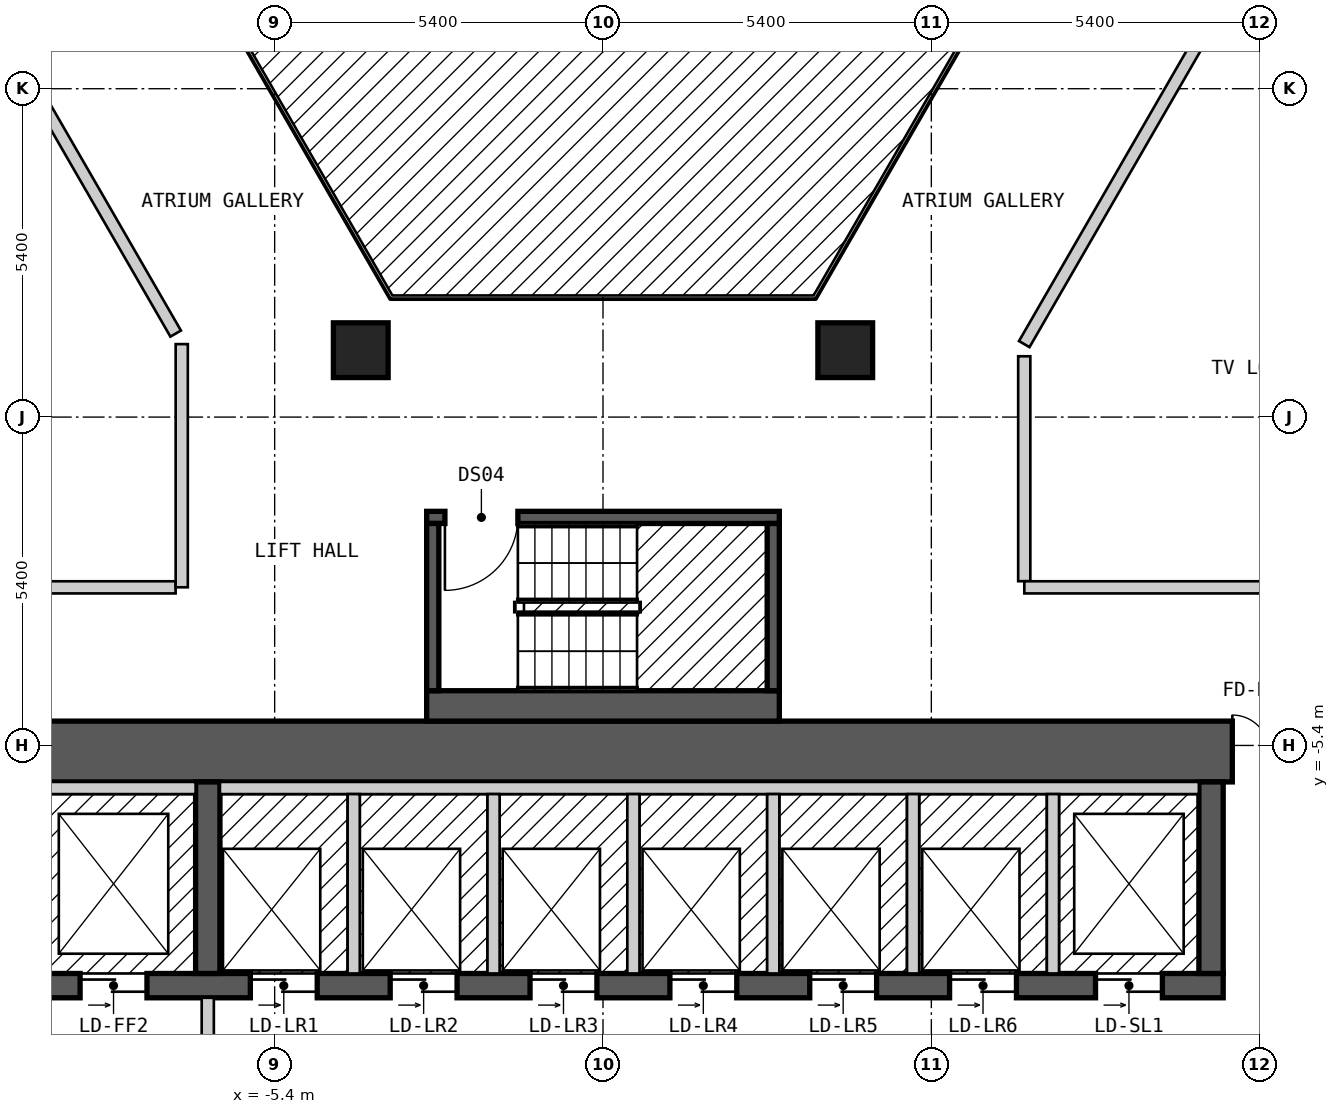
"""IFC4 building model, lengths in metres.
Left out: names, types, materials, properties, quantities, classifications, styles, units other than length and angle.
Written with IfcOpenShell. Run it as: python <this file> out.ifc"""

import sys

from ifc_helpers import new_model, si_unit, direction, frame, frame_2d, origin, origin_2d, place, context, subcontext, project, spatial, rectangle, extrude, element, fill, save


model = new_model("IFC4")
c1 = context("Model", 3, precision=1e-05, world=origin(), true_north=direction((0.0, 1.0)))
c2 = subcontext(c1, "Body", "Model", "MODEL_VIEW")
j1 = project(units=[si_unit("LENGTHUNIT", "METRE"), si_unit("PLANEANGLEUNIT", "RADIAN")], contexts=[c1])
p1 = place(None, origin())
s1 = spatial("IfcSite", under=j1, at=p1, CompositionType="ELEMENT")
p2 = place(p1, origin())
s2 = spatial("IfcBuilding", under=s1, at=p2, CompositionType="ELEMENT")
p3 = place(p2, frame((0.0, 0.0, 102.0)))
s3 = spatial("IfcBuildingStorey", under=s2, at=p3, CompositionType="ELEMENT", Elevation=102.0)
for number, where, z_axis, x_axis in (
    (1, (3.984, 1.1, 0.0), (0.0, 0.0, 1.0), (1.0, 0.0, 0.0)),
    (2, (-3.984, 1.1, 0.0), (0.0, 0.0, 1.0), (1.0, 0.0, 0.0)),
):
    element("IfcColumn", number, at=place(p3, frame(where, z_axis=z_axis, x_axis=x_axis)), inside=s3, PredefinedType="COLUMN", context=c2, shape_type="SweptSolid", body=[
        extrude(rectangle(XDim=0.9, YDim=0.9, at=origin_2d()), origin(), (0.0, 0.0, 1.0), 3.0),
    ])
p4 = place(p3, frame((-13.3, -5.5, 0.0), z_axis=(0.0, 0.0, 1.0), x_axis=(1.0, 0.0, 0.0)))
e3 = element("IfcWall", 3, at=p4, inside=s3, PredefinedType="SHEAR", context=c2, shape_type="SweptSolid", body=[
    extrude(rectangle(XDim=26.6, YDim=1.0, at=frame_2d((13.3, 0.0))), origin(), (0.0, 0.0, 1.0), 2.7),
])
p5 = place(p4, frame((23.65, 0.0, 0.0)))
e4 = element("IfcOpeningElement", 4, at=p5, cuts=e3, PredefinedType="OPENING", context=c2, shape_type="SweptSolid", body=[
    extrude(rectangle(XDim=1.2, YDim=2.1, at=frame_2d((0.6, 1.05))), frame((0.0, 0.51, 0.0), z_axis=(0.0, -1.0, 0.0), x_axis=(1.0, 0.0, 0.0)), (0.0, 0.0, 1.0), 1.02),
])
p6 = place(p3, frame((-12.3, -9.35, 0.0), z_axis=(0.0, 0.0, 1.0), x_axis=(1.0, 0.0, 0.0)))
e5 = element("IfcWall", 5, at=p6, inside=s3, PredefinedType="SHEAR", context=c2, shape_type="SweptSolid", body=[
    extrude(rectangle(XDim=22.5, YDim=0.4, at=frame_2d((11.25, 0.0))), origin(), (0.0, 0.0, 1.0), 2.7),
])
p7 = place(p6, frame((0.9, 0.0, 0.0)))
e6 = element("IfcOpeningElement", 6, at=p7, cuts=e5, PredefinedType="OPENING", context=c2, shape_type="SweptSolid", body=[
    extrude(rectangle(XDim=1.1, YDim=2.1, at=frame_2d((0.55, 1.05))), frame((0.0, 0.21, 0.0), z_axis=(0.0, -1.0, 0.0), x_axis=(1.0, 0.0, 0.0)), (0.0, 0.0, 1.0), 0.42),
])
p8 = place(p6, frame((3.7, 0.0, 0.0)))
e7 = element("IfcOpeningElement", 7, at=p8, cuts=e5, PredefinedType="OPENING", context=c2, shape_type="SweptSolid", body=[
    extrude(rectangle(XDim=1.1, YDim=2.1, at=frame_2d((0.55, 1.05))), frame((0.0, 0.21, 0.0), z_axis=(0.0, -1.0, 0.0), x_axis=(1.0, 0.0, 0.0)), (0.0, 0.0, 1.0), 0.42),
])
p9 = place(p6, frame((6.5, 0.0, 0.0)))
e8 = element("IfcOpeningElement", 8, at=p9, cuts=e5, PredefinedType="OPENING", context=c2, shape_type="SweptSolid", body=[
    extrude(rectangle(XDim=1.1, YDim=2.1, at=frame_2d((0.55, 1.05))), frame((0.0, 0.21, 0.0), z_axis=(0.0, -1.0, 0.0), x_axis=(1.0, 0.0, 0.0)), (0.0, 0.0, 1.0), 0.42),
])
p10 = place(p6, frame((8.8, 0.0, 0.0)))
e9 = element("IfcOpeningElement", 9, at=p10, cuts=e5, PredefinedType="OPENING", context=c2, shape_type="SweptSolid", body=[
    extrude(rectangle(XDim=1.1, YDim=2.1, at=frame_2d((0.55, 1.05))), frame((0.0, 0.21, 0.0), z_axis=(0.0, -1.0, 0.0), x_axis=(1.0, 0.0, 0.0)), (0.0, 0.0, 1.0), 0.42),
])
p11 = place(p6, frame((11.1, 0.0, 0.0)))
e10 = element("IfcOpeningElement", 10, at=p11, cuts=e5, PredefinedType="OPENING", context=c2, shape_type="SweptSolid", body=[
    extrude(rectangle(XDim=1.1, YDim=2.1, at=frame_2d((0.55, 1.05))), frame((0.0, 0.21, 0.0), z_axis=(0.0, -1.0, 0.0), x_axis=(1.0, 0.0, 0.0)), (0.0, 0.0, 1.0), 0.42),
])
p12 = place(p6, frame((13.4, 0.0, 0.0)))
e11 = element("IfcOpeningElement", 11, at=p12, cuts=e5, PredefinedType="OPENING", context=c2, shape_type="SweptSolid", body=[
    extrude(rectangle(XDim=1.1, YDim=2.1, at=frame_2d((0.55, 1.05))), frame((0.0, 0.21, 0.0), z_axis=(0.0, -1.0, 0.0), x_axis=(1.0, 0.0, 0.0)), (0.0, 0.0, 1.0), 0.42),
])
p13 = place(p6, frame((15.7, 0.0, 0.0)))
e12 = element("IfcOpeningElement", 12, at=p13, cuts=e5, PredefinedType="OPENING", context=c2, shape_type="SweptSolid", body=[
    extrude(rectangle(XDim=1.1, YDim=2.1, at=frame_2d((0.55, 1.05))), frame((0.0, 0.21, 0.0), z_axis=(0.0, -1.0, 0.0), x_axis=(1.0, 0.0, 0.0)), (0.0, 0.0, 1.0), 0.42),
])
p14 = place(p6, frame((18.0, 0.0, 0.0)))
e13 = element("IfcOpeningElement", 13, at=p14, cuts=e5, PredefinedType="OPENING", context=c2, shape_type="SweptSolid", body=[
    extrude(rectangle(XDim=1.1, YDim=2.1, at=frame_2d((0.55, 1.05))), frame((0.0, 0.21, 0.0), z_axis=(0.0, -1.0, 0.0), x_axis=(1.0, 0.0, 0.0)), (0.0, 0.0, 1.0), 0.42),
])
p15 = place(p6, frame((20.4, 0.0, 0.0)))
e14 = element("IfcOpeningElement", 14, at=p15, cuts=e5, PredefinedType="OPENING", context=c2, shape_type="SweptSolid", body=[
    extrude(rectangle(XDim=1.1, YDim=2.1, at=frame_2d((0.55, 1.05))), frame((0.0, 0.21, 0.0), z_axis=(0.0, -1.0, 0.0), x_axis=(1.0, 0.0, 0.0)), (0.0, 0.0, 1.0), 0.42),
])
for number, where, z_axis, x_axis in (
    (15, (-6.5, -9.15, 0.0), (0.0, 0.0, 1.0), (0.0, 1.0, 0.0)),
    (16, (10.0, -9.15, 0.0), (0.0, 0.0, 1.0), (0.0, 1.0, 0.0)),
):
    element("IfcWall", number, at=place(p3, frame(where, z_axis=z_axis, x_axis=x_axis)), inside=s3, PredefinedType="SHEAR", context=c2, shape_type="SweptSolid", body=[
        extrude(rectangle(XDim=3.15, YDim=0.4, at=frame_2d((1.575, 0.0))), origin(), (0.0, 0.0, 1.0), 2.7),
    ])
p16 = place(p3, frame((-2.9, -4.75, 0.0), z_axis=(0.0, 0.0, 1.0), x_axis=(1.0, 0.0, 0.0)))
e17 = element("IfcWall", 17, at=p16, inside=s3, PredefinedType="SOLIDWALL", context=c2, shape_type="SweptSolid", body=[
    extrude(rectangle(XDim=5.8, YDim=0.5, at=frame_2d((2.9, 0.0))), origin(), (0.0, 0.0, 1.0), 2.7),
])
p17 = place(p3, frame((-2.9, -1.65, 0.0), z_axis=(0.0, 0.0, 1.0), x_axis=(1.0, 0.0, 0.0)))
e18 = element("IfcWall", 18, at=p17, inside=s3, PredefinedType="SOLIDWALL", context=c2, shape_type="SweptSolid", body=[
    extrude(rectangle(XDim=5.8, YDim=0.2, at=frame_2d((2.9, 0.0))), origin(), (0.0, 0.0, 1.0), 2.7),
])
p18 = place(p17, frame((0.3, 0.0, 0.0)))
e19 = element("IfcOpeningElement", 19, at=p18, cuts=e18, PredefinedType="OPENING", context=c2, shape_type="SweptSolid", body=[
    extrude(rectangle(XDim=1.2, YDim=2.1, at=frame_2d((0.6, 1.05))), frame((0.0, 0.11, 0.0), z_axis=(0.0, -1.0, 0.0), x_axis=(1.0, 0.0, 0.0)), (0.0, 0.0, 1.0), 0.22),
])
for number, where, z_axis, x_axis in (
    (20, (-2.8, -4.5, 0.0), (0.0, 0.0, 1.0), (0.0, 1.0, 0.0)),
    (21, (2.8, -4.5, 0.0), (0.0, 0.0, 1.0), (0.0, 1.0, 0.0)),
):
    element("IfcWall", number, at=place(p3, frame(where, z_axis=z_axis, x_axis=x_axis)), inside=s3, PredefinedType="SOLIDWALL", context=c2, shape_type="SweptSolid", body=[
        extrude(rectangle(XDim=2.75, YDim=0.2, at=frame_2d((1.375, 0.0))), origin(), (0.0, 0.0, 1.0), 2.7),
    ])
p19 = place(p3, frame((-10.796, 7.899, 0.0), z_axis=(0.0, 0.0, 1.0), x_axis=(0.500010383074, -0.866019409031, 0.0)))
e22 = element("IfcWall", 22, at=p19, inside=s3, PredefinedType="PARTITIONING", context=c2, shape_type="SweptSolid", body=[
    extrude(rectangle(XDim=7.535, YDim=0.2, at=frame_2d((3.768, 0.0))), origin(), (0.0, 0.0, 1.0), 2.7),
])
p20 = place(p3, frame((8.488, 16.5, 0.0), z_axis=(0.0, 0.0, 1.0), x_axis=(0.499986836607, -0.86603300354, 0.0)))
e23 = element("IfcWall", 23, at=p20, inside=s3, PredefinedType="PARTITIONING", context=c2, shape_type="SweptSolid", body=[
    extrude(rectangle(XDim=20.09, YDim=0.2, at=frame_2d((10.045, 0.0))), origin(), (0.0, 0.0, 1.0), 2.7),
])
p21 = place(p20, frame((14.569, 0.0, 0.0)))
e24 = element("IfcOpeningElement", 24, at=p21, cuts=e23, PredefinedType="OPENING", context=c2, shape_type="SweptSolid", body=[
    extrude(rectangle(XDim=1.0, YDim=2.1, at=frame_2d((0.5, 1.05))), frame((0.0, 0.11, 0.0), z_axis=(0.0, -1.0, 0.0), x_axis=(1.0, 0.0, 0.0)), (0.0, 0.0, 1.0), 0.22),
])
p22 = place(p20, frame((4.547, 0.0, 0.0)))
e25 = element("IfcOpeningElement", 25, at=p22, cuts=e23, PredefinedType="OPENING", context=c2, shape_type="SweptSolid", body=[
    extrude(rectangle(XDim=1.0, YDim=2.1, at=frame_2d((0.5, 1.05))), frame((0.0, 0.11, 0.0), z_axis=(0.0, -1.0, 0.0), x_axis=(1.0, 0.0, 0.0)), (0.0, 0.0, 1.0), 0.22),
])
p23 = place(p3, frame((6.928, 1.0, 0.0), z_axis=(0.0, 0.0, 1.0), x_axis=(0.0, -1.0, 0.0)))
e26 = element("IfcWall", 26, at=p23, inside=s3, PredefinedType="PARTITIONING", context=c2, shape_type="SweptSolid", body=[
    extrude(rectangle(XDim=3.699, YDim=0.2, at=frame_2d((1.85, 0.0))), origin(), (0.0, 0.0, 1.0), 2.7),
])
p24 = place(p3, frame((-15.011, -2.8, 0.0), z_axis=(0.0, 0.0, 1.0), x_axis=(1.0, 0.0, 0.0)))
e27 = element("IfcWall", 27, at=p24, inside=s3, PredefinedType="PARTITIONING", context=c2, shape_type="SweptSolid", body=[
    extrude(rectangle(XDim=7.982, YDim=0.2, at=frame_2d((3.991, 0.0))), origin(), (0.0, 0.0, 1.0), 2.7),
])
p25 = place(p3, frame((6.929, -2.8, 0.0), z_axis=(0.0, 0.0, 1.0), x_axis=(1.0, 0.0, 0.0)))
e28 = element("IfcWall", 28, at=p25, inside=s3, PredefinedType="PARTITIONING", context=c2, shape_type="SweptSolid", body=[
    extrude(rectangle(XDim=7.966, YDim=0.2, at=frame_2d((3.983, 0.0))), origin(), (0.0, 0.0, 1.0), 2.7),
])
p26 = place(p3, frame((6.928, 1.2, 0.0), z_axis=(0.0, 0.0, 1.0), x_axis=(0.500055327065, 0.865993458332, 0.0)))
e29 = element("IfcWall", 29, at=p26, inside=s3, PredefinedType="PARTITIONING", context=c2, shape_type="SweptSolid", body=[
    extrude(rectangle(XDim=7.851, YDim=0.2, at=frame_2d((3.926, 0.0))), origin(), (0.0, 0.0, 1.0), 2.7),
])
p27 = place(p3, frame((-18.562, -0.951, 0.0), z_axis=(0.0, 0.0, 1.0), x_axis=(0.499987097491, 0.866032852923, 0.0)))
e30 = element("IfcWall", 30, at=p27, inside=s3, PredefinedType="PARTITIONING", context=c2, shape_type="SweptSolid", body=[
    extrude(rectangle(XDim=20.15, YDim=0.2, at=frame_2d((10.075, 0.0))), origin(), (0.0, 0.0, 1.0), 2.7),
])
p28 = place(p27, frame((14.627, 0.0, 0.0)))
e31 = element("IfcOpeningElement", 31, at=p28, cuts=e30, PredefinedType="OPENING", context=c2, shape_type="SweptSolid", body=[
    extrude(rectangle(XDim=1.0, YDim=2.1, at=frame_2d((0.5, 1.05))), frame((0.0, 0.11, 0.0), z_axis=(0.0, -1.0, 0.0), x_axis=(1.0, 0.0, 0.0)), (0.0, 0.0, 1.0), 0.22),
])
p29 = place(p27, frame((9.604, 0.0, 0.0)))
e32 = element("IfcOpeningElement", 32, at=p29, cuts=e30, PredefinedType="OPENING", context=c2, shape_type="SweptSolid", body=[
    extrude(rectangle(XDim=1.0, YDim=2.1, at=frame_2d((0.5, 1.05))), frame((0.0, 0.11, 0.0), z_axis=(0.0, -1.0, 0.0), x_axis=(1.0, 0.0, 0.0)), (0.0, 0.0, 1.0), 0.22),
])
p30 = place(p3, frame((-6.928, -2.799, 0.0), z_axis=(0.0, 0.0, 1.0), x_axis=(0.0, 1.0, 0.0)))
e33 = element("IfcWall", 33, at=p30, inside=s3, PredefinedType="PARTITIONING", context=c2, shape_type="SweptSolid", body=[
    extrude(rectangle(XDim=3.999, YDim=0.2, at=frame_2d((2.0, 0.0))), origin(), (0.0, 0.0, 1.0), 2.7),
])
p31 = place(p3, frame((-12.1, -6.1, 0.0), z_axis=(0.0, 0.0, 1.0), x_axis=(1.0, 0.0, 0.0)))
e34 = element("IfcWall", 34, at=p31, inside=s3, PredefinedType="SOLIDWALL", context=c2, shape_type="SweptSolid", body=[
    extrude(rectangle(XDim=5.4, YDim=0.2, at=frame_2d((2.7, 0.0))), origin(), (0.0, 0.0, 1.0), 2.7),
])
p32 = place(p3, frame((-6.5, -14.45, 0.0), z_axis=(0.0, 0.0, 1.0), x_axis=(0.0, 1.0, 0.0)))
e35 = element("IfcWall", 35, at=p32, inside=s3, PredefinedType="PARTITIONING", context=c2, shape_type="SweptSolid", body=[
    extrude(rectangle(XDim=4.9, YDim=0.2, at=frame_2d((2.45, 0.0))), origin(), (0.0, 0.0, 1.0), 2.7),
])
p33 = place(p32, frame((3.15, 0.0, 0.0), z_axis=(0.0, 0.0, 1.0), x_axis=(-1.0, 0.0, 0.0)))
e36 = element("IfcOpeningElement", 36, at=p33, cuts=e35, PredefinedType="OPENING", context=c2, shape_type="SweptSolid", body=[
    extrude(rectangle(XDim=1.4, YDim=2.1, at=frame_2d((0.7, 1.05))), frame((0.0, 0.11, 0.0), z_axis=(0.0, -1.0, 0.0), x_axis=(1.0, 0.0, 0.0)), (0.0, 0.0, 1.0), 0.22),
])
p34 = place(p3, frame((-6.3, -6.1, 0.0), z_axis=(0.0, 0.0, 1.0), x_axis=(1.0, 0.0, 0.0)))
e37 = element("IfcWall", 37, at=p34, inside=s3, PredefinedType="SOLIDWALL", context=c2, shape_type="SweptSolid", body=[
    extrude(rectangle(XDim=16.1, YDim=0.2, at=frame_2d((8.05, 0.0))), origin(), (0.0, 0.0, 1.0), 2.7),
])
for number, where, z_axis, x_axis in (
    (38, (-4.1, -9.15, 0.0), (0.0, 0.0, 1.0), (0.0, 1.0, 0.0)),
    (39, (-1.8, -9.15, 0.0), (0.0, 0.0, 1.0), (0.0, 1.0, 0.0)),
    (40, (0.5, -9.15, 0.0), (0.0, 0.0, 1.0), (0.0, 1.0, 0.0)),
    (41, (2.8, -9.15, 0.0), (0.0, 0.0, 1.0), (0.0, 1.0, 0.0)),
    (42, (5.1, -9.15, 0.0), (0.0, 0.0, 1.0), (0.0, 1.0, 0.0)),
    (43, (7.4, -9.15, 0.0), (0.0, 0.0, 1.0), (0.0, 1.0, 0.0)),
):
    element("IfcWall", number, at=place(p3, frame(where, z_axis=z_axis, x_axis=x_axis)), inside=s3, PredefinedType="SOLIDWALL", context=c2, shape_type="SweptSolid", body=[
        extrude(rectangle(XDim=2.95, YDim=0.2, at=frame_2d((1.475, 0.0))), origin(), (0.0, 0.0, 1.0), 2.7),
    ])
p35 = place(p18, origin())
e44 = element("IfcDoor", 44, at=p35, inside=s3, OperationType="SINGLE_SWING_LEFT", PredefinedType="DOOR", context=c2, shape_type="SweptSolid", body=[
    extrude(rectangle(XDim=1.2, YDim=2.1, at=frame_2d((0.6, 1.05))), frame((0.0, 0.025, 0.0), z_axis=(0.0, -1.0, 0.0), x_axis=(1.0, 0.0, 0.0)), (0.0, 0.0, 1.0), 0.05),
])
fill(e19, e44)
p36 = place(p8, origin())
e45 = element("IfcDoor", 45, at=p36, inside=s3, OperationType="DOUBLE_DOOR_SLIDING", PredefinedType="DOOR", context=c2, shape_type="SweptSolid", body=[
    extrude(rectangle(XDim=1.1, YDim=2.1, at=frame_2d((0.55, 1.05))), frame((0.0, 0.025, 0.0), z_axis=(0.0, -1.0, 0.0), x_axis=(1.0, 0.0, 0.0)), (0.0, 0.0, 1.0), 0.05),
])
fill(e7, e45)
p37 = place(p9, origin())
e46 = element("IfcDoor", 46, at=p37, inside=s3, OperationType="DOUBLE_DOOR_SLIDING", PredefinedType="DOOR", context=c2, shape_type="SweptSolid", body=[
    extrude(rectangle(XDim=1.1, YDim=2.1, at=frame_2d((0.55, 1.05))), frame((0.0, 0.025, 0.0), z_axis=(0.0, -1.0, 0.0), x_axis=(1.0, 0.0, 0.0)), (0.0, 0.0, 1.0), 0.05),
])
fill(e8, e46)
p38 = place(p10, origin())
e47 = element("IfcDoor", 47, at=p38, inside=s3, OperationType="DOUBLE_DOOR_SLIDING", PredefinedType="DOOR", context=c2, shape_type="SweptSolid", body=[
    extrude(rectangle(XDim=1.1, YDim=2.1, at=frame_2d((0.55, 1.05))), frame((0.0, 0.025, 0.0), z_axis=(0.0, -1.0, 0.0), x_axis=(1.0, 0.0, 0.0)), (0.0, 0.0, 1.0), 0.05),
])
fill(e9, e47)
p39 = place(p11, origin())
e48 = element("IfcDoor", 48, at=p39, inside=s3, OperationType="DOUBLE_DOOR_SLIDING", PredefinedType="DOOR", context=c2, shape_type="SweptSolid", body=[
    extrude(rectangle(XDim=1.1, YDim=2.1, at=frame_2d((0.55, 1.05))), frame((0.0, 0.025, 0.0), z_axis=(0.0, -1.0, 0.0), x_axis=(1.0, 0.0, 0.0)), (0.0, 0.0, 1.0), 0.05),
])
fill(e10, e48)
p40 = place(p12, origin())
e49 = element("IfcDoor", 49, at=p40, inside=s3, OperationType="DOUBLE_DOOR_SLIDING", PredefinedType="DOOR", context=c2, shape_type="SweptSolid", body=[
    extrude(rectangle(XDim=1.1, YDim=2.1, at=frame_2d((0.55, 1.05))), frame((0.0, 0.025, 0.0), z_axis=(0.0, -1.0, 0.0), x_axis=(1.0, 0.0, 0.0)), (0.0, 0.0, 1.0), 0.05),
])
fill(e11, e49)
p41 = place(p13, origin())
e50 = element("IfcDoor", 50, at=p41, inside=s3, OperationType="DOUBLE_DOOR_SLIDING", PredefinedType="DOOR", context=c2, shape_type="SweptSolid", body=[
    extrude(rectangle(XDim=1.1, YDim=2.1, at=frame_2d((0.55, 1.05))), frame((0.0, 0.025, 0.0), z_axis=(0.0, -1.0, 0.0), x_axis=(1.0, 0.0, 0.0)), (0.0, 0.0, 1.0), 0.05),
])
fill(e12, e50)
p42 = place(p14, origin())
e51 = element("IfcDoor", 51, at=p42, inside=s3, OperationType="DOUBLE_DOOR_SLIDING", PredefinedType="DOOR", context=c2, shape_type="SweptSolid", body=[
    extrude(rectangle(XDim=1.1, YDim=2.1, at=frame_2d((0.55, 1.05))), frame((0.0, 0.025, 0.0), z_axis=(0.0, -1.0, 0.0), x_axis=(1.0, 0.0, 0.0)), (0.0, 0.0, 1.0), 0.05),
])
fill(e13, e51)
p43 = place(p15, origin())
e52 = element("IfcDoor", 52, at=p43, inside=s3, OperationType="DOUBLE_DOOR_SLIDING", PredefinedType="DOOR", context=c2, shape_type="SweptSolid", body=[
    extrude(rectangle(XDim=1.1, YDim=2.1, at=frame_2d((0.55, 1.05))), frame((0.0, 0.025, 0.0), z_axis=(0.0, -1.0, 0.0), x_axis=(1.0, 0.0, 0.0)), (0.0, 0.0, 1.0), 0.05),
])
fill(e14, e52)
p44 = place(p5, origin())
e53 = element("IfcDoor", 53, at=p44, inside=s3, OperationType="DOUBLE_DOOR_SINGLE_SWING", PredefinedType="DOOR", context=c2, shape_type="SweptSolid", body=[
    extrude(rectangle(XDim=1.2, YDim=2.1, at=frame_2d((0.6, 1.05))), frame((0.0, 0.025, 0.0), z_axis=(0.0, -1.0, 0.0), x_axis=(1.0, 0.0, 0.0)), (0.0, 0.0, 1.0), 0.05),
])
fill(e4, e53)
save(model, sys.argv[1])
